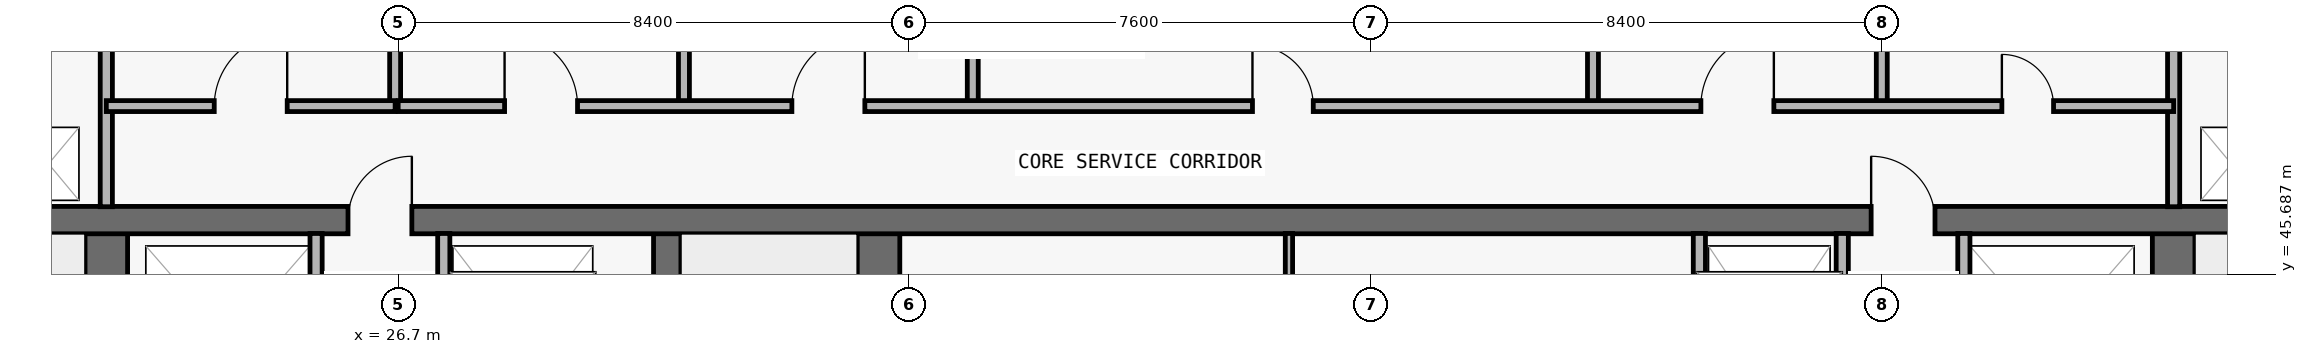
"""IFC4 building model, lengths in metres.
Left out: names, types, materials, properties, quantities, classifications, styles, units other than length and angle.
Written with IfcOpenShell. Run it as: python <this file> out.ifc"""

import sys

from ifc_helpers import new_model, si_unit, direction, frame, frame_2d, origin, place, context, subcontext, project, spatial, rectangle, extrude, element, fill, save


model = new_model("IFC4")
c1 = context("Model", 3, precision=1e-05, world=origin(), true_north=direction((0.0, 1.0)))
c2 = subcontext(c1, "Body", "Model", "MODEL_VIEW")
j1 = project(units=[si_unit("LENGTHUNIT", "METRE"), si_unit("PLANEANGLEUNIT", "RADIAN")], contexts=[c1])
p1 = place(None, origin())
s1 = spatial("IfcSite", under=j1, at=p1, CompositionType="ELEMENT")
p2 = place(p1, origin())
s2 = spatial("IfcBuilding", under=s1, at=p2, CompositionType="ELEMENT")
p3 = place(p2, frame((0.0, 0.0, 211.5)))
s3 = spatial("IfcBuildingStorey", under=s2, at=p3, CompositionType="ELEMENT", Elevation=211.5)
p4 = place(p3, frame((21.9, 37.0, 0.0), z_axis=(0.0, 0.0, 1.0), x_axis=(0.0, 1.0, 0.0)))
e1 = element("IfcWall", 1, at=p4, inside=s3, PredefinedType="SHEAR", context=c2, shape_type="SweptSolid", body=[
    extrude(rectangle(XDim=9.575, YDim=0.7, at=frame_2d((4.788, 0.0))), origin(), (0.0, 0.0, 1.0), 3.05),
])
p5 = place(p4, frame((0.55, 0.0, 0.0)))
e2 = element("IfcOpeningElement", 2, at=p5, cuts=e1, PredefinedType="OPENING", context=c2, shape_type="SweptSolid", body=[
    extrude(rectangle(XDim=1.1, YDim=2.15, at=frame_2d((0.55, 1.075))), frame((0.0, 0.36, 0.0), z_axis=(0.0, -1.0, 0.0), x_axis=(1.0, 0.0, 0.0)), (0.0, 0.0, 1.0), 0.72),
])
p6 = place(p3, frame((55.9, 37.0, 0.0), z_axis=(0.0, 0.0, 1.0), x_axis=(0.0, 1.0, 0.0)))
e3 = element("IfcWall", 3, at=p6, inside=s3, PredefinedType="SHEAR", context=c2, shape_type="SweptSolid", body=[
    extrude(rectangle(XDim=9.575, YDim=0.7, at=frame_2d((4.788, 0.0))), origin(), (0.0, 0.0, 1.0), 3.05),
])
p7 = place(p6, frame((0.55, 0.0, 0.0)))
e4 = element("IfcOpeningElement", 4, at=p7, cuts=e3, PredefinedType="OPENING", context=c2, shape_type="SweptSolid", body=[
    extrude(rectangle(XDim=1.1, YDim=2.15, at=frame_2d((0.55, 1.075))), frame((0.0, 0.36, 0.0), z_axis=(0.0, -1.0, 0.0), x_axis=(1.0, 0.0, 0.0)), (0.0, 0.0, 1.0), 0.72),
])
p8 = place(p3, frame((31.125, 37.0, 0.0), z_axis=(0.0, 0.0, 1.0), x_axis=(0.0, 1.0, 0.0)))
e5 = element("IfcWall", 5, at=p8, inside=s3, PredefinedType="SHEAR", context=c2, shape_type="SweptSolid", body=[
    extrude(rectangle(XDim=9.575, YDim=0.45, at=frame_2d((4.788, 0.0))), origin(), (0.0, 0.0, 1.0), 3.05),
])
p9 = place(p3, frame((34.6, 37.0, 0.0), z_axis=(0.0, 0.0, 1.0), x_axis=(0.0, 1.0, 0.0)))
e6 = element("IfcWall", 6, at=p9, inside=s3, PredefinedType="SHEAR", context=c2, shape_type="SweptSolid", body=[
    extrude(rectangle(XDim=9.575, YDim=0.7, at=frame_2d((4.788, 0.0))), origin(), (0.0, 0.0, 1.0), 3.05),
])
p10 = place(p3, frame((18.3, 46.575, 0.0), z_axis=(0.0, 0.0, 1.0), x_axis=(1.0, 0.0, 0.0)))
e7 = element("IfcWall", 7, at=p10, inside=s3, PredefinedType="SHEAR", context=c2, shape_type="SweptSolid", body=[
    extrude(rectangle(XDim=41.2, YDim=0.45, at=frame_2d((20.6, 0.0))), origin(), (0.0, 0.0, 1.0), 3.05),
])
p11 = place(p10, frame((7.575, 0.0, 0.0)))
e8 = element("IfcOpeningElement", 8, at=p11, cuts=e7, PredefinedType="OPENING", context=c2, shape_type="SweptSolid", body=[
    extrude(rectangle(XDim=1.05, YDim=2.15, at=frame_2d((0.525, 1.075))), frame((0.0, 0.235, 0.0), z_axis=(0.0, -1.0, 0.0), x_axis=(1.0, 0.0, 0.0)), (0.0, 0.0, 1.0), 0.47),
])
p12 = place(p10, frame((32.625, 0.0, 0.0)))
e9 = element("IfcOpeningElement", 9, at=p12, cuts=e7, PredefinedType="OPENING", context=c2, shape_type="SweptSolid", body=[
    extrude(rectangle(XDim=1.05, YDim=2.15, at=frame_2d((0.525, 1.075))), frame((0.0, 0.235, 0.0), z_axis=(0.0, -1.0, 0.0), x_axis=(1.0, 0.0, 0.0)), (0.0, 0.0, 1.0), 0.47),
])
p13 = place(p3, frame((21.9, 46.795, 0.0), z_axis=(0.0, 0.0, 1.0), x_axis=(0.0, 1.0, 0.0)))
e10 = element("IfcWall", 10, at=p13, inside=s3, PredefinedType="PARTITIONING", context=c2, shape_type="SweptSolid", body=[
    extrude(rectangle(XDim=3.16, YDim=0.2, at=frame_2d((1.58, 0.0))), origin(), (0.0, 0.0, 1.0), 3.05),
])
p14 = place(p3, frame((25.35, 43.17, 0.0), z_axis=(0.0, 0.0, 1.0), x_axis=(0.0, 1.0, 0.0)))
e11 = element("IfcWall", 11, at=p14, inside=s3, PredefinedType="PARTITIONING", context=c2, shape_type="SweptSolid", body=[
    extrude(rectangle(XDim=3.185, YDim=0.2, at=frame_2d((1.593, 0.0))), origin(), (0.0, 0.0, 1.0), 3.05),
])
p15 = place(p3, frame((26.65, 48.45, 0.0), z_axis=(0.0, 0.0, 1.0), x_axis=(0.0, 1.0, 0.0)))
e12 = element("IfcWall", 12, at=p15, inside=s3, PredefinedType="PARTITIONING", context=c2, shape_type="SweptSolid", body=[
    extrude(rectangle(XDim=1.505, YDim=0.18, at=frame_2d((0.752, 0.0))), origin(), (0.0, 0.0, 1.0), 3.05),
])
p16 = place(p3, frame((27.45, 43.17, 0.0), z_axis=(0.0, 0.0, 1.0), x_axis=(0.0, 1.0, 0.0)))
e13 = element("IfcWall", 13, at=p16, inside=s3, PredefinedType="PARTITIONING", context=c2, shape_type="SweptSolid", body=[
    extrude(rectangle(XDim=3.185, YDim=0.2, at=frame_2d((1.593, 0.0))), origin(), (0.0, 0.0, 1.0), 3.05),
])
for number, where, z_axis, x_axis in (
    (14, (31.4, 48.45, 0.0), (0.0, 0.0, 1.0), (0.0, 1.0, 0.0)),
    (15, (36.15, 48.45, 0.0), (0.0, 0.0, 1.0), (0.0, 1.0, 0.0)),
):
    element("IfcWall", number, at=place(p3, frame(where, z_axis=z_axis, x_axis=x_axis)), inside=s3, PredefinedType="PARTITIONING", context=c2, shape_type="SweptSolid", body=[
        extrude(rectangle(XDim=1.505, YDim=0.18, at=frame_2d((0.752, 0.0))), origin(), (0.0, 0.0, 1.0), 3.05),
    ])
p17 = place(p3, frame((41.35, 43.17, 0.0), z_axis=(0.0, 0.0, 1.0), x_axis=(0.0, 1.0, 0.0)))
e16 = element("IfcWall", 16, at=p17, inside=s3, PredefinedType="PARTITIONING", context=c2, shape_type="SweptSolid", body=[
    extrude(rectangle(XDim=3.185, YDim=0.12, at=frame_2d((1.593, 0.0))), origin(), (0.0, 0.0, 1.0), 3.05),
])
p18 = place(p3, frame((46.35, 48.45, 0.0), z_axis=(0.0, 0.0, 1.0), x_axis=(0.0, 1.0, 0.0)))
e17 = element("IfcWall", 17, at=p18, inside=s3, PredefinedType="PARTITIONING", context=c2, shape_type="SweptSolid", body=[
    extrude(rectangle(XDim=1.505, YDim=0.18, at=frame_2d((0.752, 0.0))), origin(), (0.0, 0.0, 1.0), 3.05),
])
for number, where, z_axis, x_axis in (
    (18, (48.1, 43.17, 0.0), (0.0, 0.0, 1.0), (0.0, 1.0, 0.0)),
    (19, (50.45, 43.17, 0.0), (0.0, 0.0, 1.0), (0.0, 1.0, 0.0)),
):
    element("IfcWall", number, at=place(p3, frame(where, z_axis=z_axis, x_axis=x_axis)), inside=s3, PredefinedType="PARTITIONING", context=c2, shape_type="SweptSolid", body=[
        extrude(rectangle(XDim=3.185, YDim=0.2, at=frame_2d((1.593, 0.0))), origin(), (0.0, 0.0, 1.0), 3.05),
    ])
p19 = place(p3, frame((51.1, 48.45, 0.0), z_axis=(0.0, 0.0, 1.0), x_axis=(0.0, 1.0, 0.0)))
e20 = element("IfcWall", 20, at=p19, inside=s3, PredefinedType="PARTITIONING", context=c2, shape_type="SweptSolid", body=[
    extrude(rectangle(XDim=1.505, YDim=0.18, at=frame_2d((0.752, 0.0))), origin(), (0.0, 0.0, 1.0), 3.05),
])
p20 = place(p3, frame((52.45, 43.17, 0.0), z_axis=(0.0, 0.0, 1.0), x_axis=(0.0, 1.0, 0.0)))
e21 = element("IfcWall", 21, at=p20, inside=s3, PredefinedType="PARTITIONING", context=c2, shape_type="SweptSolid", body=[
    extrude(rectangle(XDim=3.185, YDim=0.2, at=frame_2d((1.593, 0.0))), origin(), (0.0, 0.0, 1.0), 3.05),
])
p21 = place(p3, frame((55.9, 46.795, 0.0), z_axis=(0.0, 0.0, 1.0), x_axis=(0.0, 1.0, 0.0)))
e22 = element("IfcWall", 22, at=p21, inside=s3, PredefinedType="PARTITIONING", context=c2, shape_type="SweptSolid", body=[
    extrude(rectangle(XDim=3.16, YDim=0.2, at=frame_2d((1.58, 0.0))), origin(), (0.0, 0.0, 1.0), 3.05),
])
p22 = place(p3, frame((21.9, 48.45, 0.0), z_axis=(0.0, 0.0, 1.0), x_axis=(1.0, 0.0, 0.0)))
e23 = element("IfcWall", 23, at=p22, inside=s3, PredefinedType="PARTITIONING", context=c2, shape_type="SweptSolid", body=[
    extrude(rectangle(XDim=4.75, YDim=0.18, at=frame_2d((2.375, 0.0))), origin(), (0.0, 0.0, 1.0), 3.05),
])
p23 = place(p22, frame((1.775, 0.0, 0.0)))
e24 = element("IfcOpeningElement", 24, at=p23, cuts=e23, PredefinedType="OPENING", context=c2, shape_type="SweptSolid", body=[
    extrude(rectangle(XDim=1.2, YDim=2.2, at=frame_2d((0.6, 1.1))), frame((0.0, 0.1, 0.0), z_axis=(0.0, -1.0, 0.0), x_axis=(1.0, 0.0, 0.0)), (0.0, 0.0, 1.0), 0.2),
])
p24 = place(p3, frame((26.7, 48.45, 0.0), z_axis=(0.0, 0.0, 1.0), x_axis=(1.0, 0.0, 0.0)))
e25 = element("IfcWall", 25, at=p24, inside=s3, PredefinedType="PARTITIONING", context=c2, shape_type="SweptSolid", body=[
    extrude(rectangle(XDim=29.2, YDim=0.18, at=frame_2d((14.6, 0.0))), origin(), (0.0, 0.0, 1.0), 3.05),
])
p25 = place(p24, frame((1.75, 0.0, 0.0)))
e26 = element("IfcOpeningElement", 26, at=p25, cuts=e25, PredefinedType="OPENING", context=c2, shape_type="SweptSolid", body=[
    extrude(rectangle(XDim=1.2, YDim=2.2, at=frame_2d((0.6, 1.1))), frame((0.0, 0.1, 0.0), z_axis=(0.0, -1.0, 0.0), x_axis=(1.0, 0.0, 0.0)), (0.0, 0.0, 1.0), 0.2),
])
p26 = place(p24, frame((6.475, 0.0, 0.0)))
e27 = element("IfcOpeningElement", 27, at=p26, cuts=e25, PredefinedType="OPENING", context=c2, shape_type="SweptSolid", body=[
    extrude(rectangle(XDim=1.2, YDim=2.2, at=frame_2d((0.6, 1.1))), frame((0.0, 0.1, 0.0), z_axis=(0.0, -1.0, 0.0), x_axis=(1.0, 0.0, 0.0)), (0.0, 0.0, 1.0), 0.2),
])
p27 = place(p24, frame((14.05, 0.0, 0.0)))
e28 = element("IfcOpeningElement", 28, at=p27, cuts=e25, PredefinedType="OPENING", context=c2, shape_type="SweptSolid", body=[
    extrude(rectangle(XDim=1.0, YDim=2.2, at=frame_2d((0.5, 1.1))), frame((0.0, 0.1, 0.0), z_axis=(0.0, -1.0, 0.0), x_axis=(1.0, 0.0, 0.0)), (0.0, 0.0, 1.0), 0.2),
])
p28 = place(p24, frame((21.425, 0.0, 0.0)))
e29 = element("IfcOpeningElement", 29, at=p28, cuts=e25, PredefinedType="OPENING", context=c2, shape_type="SweptSolid", body=[
    extrude(rectangle(XDim=1.2, YDim=2.2, at=frame_2d((0.6, 1.1))), frame((0.0, 0.1, 0.0), z_axis=(0.0, -1.0, 0.0), x_axis=(1.0, 0.0, 0.0)), (0.0, 0.0, 1.0), 0.2),
])
p29 = place(p24, frame((26.375, 0.0, 0.0)))
e30 = element("IfcOpeningElement", 30, at=p29, cuts=e25, PredefinedType="OPENING", context=c2, shape_type="SweptSolid", body=[
    extrude(rectangle(XDim=0.85, YDim=2.1, at=frame_2d((0.425, 1.05))), frame((0.0, 0.1, 0.0), z_axis=(0.0, -1.0, 0.0), x_axis=(1.0, 0.0, 0.0)), (0.0, 0.0, 1.0), 0.2),
])
p30 = place(p11, origin())
e31 = element("IfcDoor", 31, at=p30, inside=s3, OperationType="SINGLE_SWING_RIGHT", PredefinedType="DOOR", context=c2, shape_type="SweptSolid", body=[
    extrude(rectangle(XDim=1.05, YDim=2.15, at=frame_2d((0.525, 1.075))), frame((0.0, 0.025, 0.0), z_axis=(0.0, -1.0, 0.0), x_axis=(1.0, 0.0, 0.0)), (0.0, 0.0, 1.0), 0.05),
])
fill(e8, e31)
p31 = place(p12, origin())
e32 = element("IfcDoor", 32, at=p31, inside=s3, OperationType="SINGLE_SWING_LEFT", PredefinedType="DOOR", context=c2, shape_type="SweptSolid", body=[
    extrude(rectangle(XDim=1.05, YDim=2.15, at=frame_2d((0.525, 1.075))), frame((0.0, 0.025, 0.0), z_axis=(0.0, -1.0, 0.0), x_axis=(1.0, 0.0, 0.0)), (0.0, 0.0, 1.0), 0.05),
])
fill(e9, e32)
p32 = place(p23, origin())
e33 = element("IfcDoor", 33, at=p32, inside=s3, OperationType="SINGLE_SWING_RIGHT", PredefinedType="DOOR", context=c2, shape_type="SweptSolid", body=[
    extrude(rectangle(XDim=1.2, YDim=2.2, at=frame_2d((0.6, 1.1))), frame((0.0, 0.025, 0.0), z_axis=(0.0, -1.0, 0.0), x_axis=(1.0, 0.0, 0.0)), (0.0, 0.0, 1.0), 0.05),
])
fill(e24, e33)
p33 = place(p25, origin())
e34 = element("IfcDoor", 34, at=p33, inside=s3, OperationType="SINGLE_SWING_LEFT", PredefinedType="DOOR", context=c2, shape_type="SweptSolid", body=[
    extrude(rectangle(XDim=1.2, YDim=2.2, at=frame_2d((0.6, 1.1))), frame((0.0, 0.025, 0.0), z_axis=(0.0, -1.0, 0.0), x_axis=(1.0, 0.0, 0.0)), (0.0, 0.0, 1.0), 0.05),
])
fill(e26, e34)
p34 = place(p26, origin())
e35 = element("IfcDoor", 35, at=p34, inside=s3, OperationType="SINGLE_SWING_RIGHT", PredefinedType="DOOR", context=c2, shape_type="SweptSolid", body=[
    extrude(rectangle(XDim=1.2, YDim=2.2, at=frame_2d((0.6, 1.1))), frame((0.0, 0.025, 0.0), z_axis=(0.0, -1.0, 0.0), x_axis=(1.0, 0.0, 0.0)), (0.0, 0.0, 1.0), 0.05),
])
fill(e27, e35)
p35 = place(p27, origin())
e36 = element("IfcDoor", 36, at=p35, inside=s3, OperationType="SINGLE_SWING_LEFT", PredefinedType="DOOR", context=c2, shape_type="SweptSolid", body=[
    extrude(rectangle(XDim=1.0, YDim=2.2, at=frame_2d((0.5, 1.1))), frame((0.0, 0.025, 0.0), z_axis=(0.0, -1.0, 0.0), x_axis=(1.0, 0.0, 0.0)), (0.0, 0.0, 1.0), 0.05),
])
fill(e28, e36)
p36 = place(p28, origin())
e37 = element("IfcDoor", 37, at=p36, inside=s3, OperationType="SINGLE_SWING_RIGHT", PredefinedType="DOOR", context=c2, shape_type="SweptSolid", body=[
    extrude(rectangle(XDim=1.2, YDim=2.2, at=frame_2d((0.6, 1.1))), frame((0.0, 0.025, 0.0), z_axis=(0.0, -1.0, 0.0), x_axis=(1.0, 0.0, 0.0)), (0.0, 0.0, 1.0), 0.05),
])
fill(e29, e37)
p37 = place(p29, origin())
e38 = element("IfcDoor", 38, at=p37, inside=s3, OperationType="SINGLE_SWING_LEFT", PredefinedType="DOOR", context=c2, shape_type="SweptSolid", body=[
    extrude(rectangle(XDim=0.85, YDim=2.1, at=frame_2d((0.425, 1.05))), frame((0.0, 0.025, 0.0), z_axis=(0.0, -1.0, 0.0), x_axis=(1.0, 0.0, 0.0)), (0.0, 0.0, 1.0), 0.05),
])
fill(e30, e38)
save(model, sys.argv[1])
